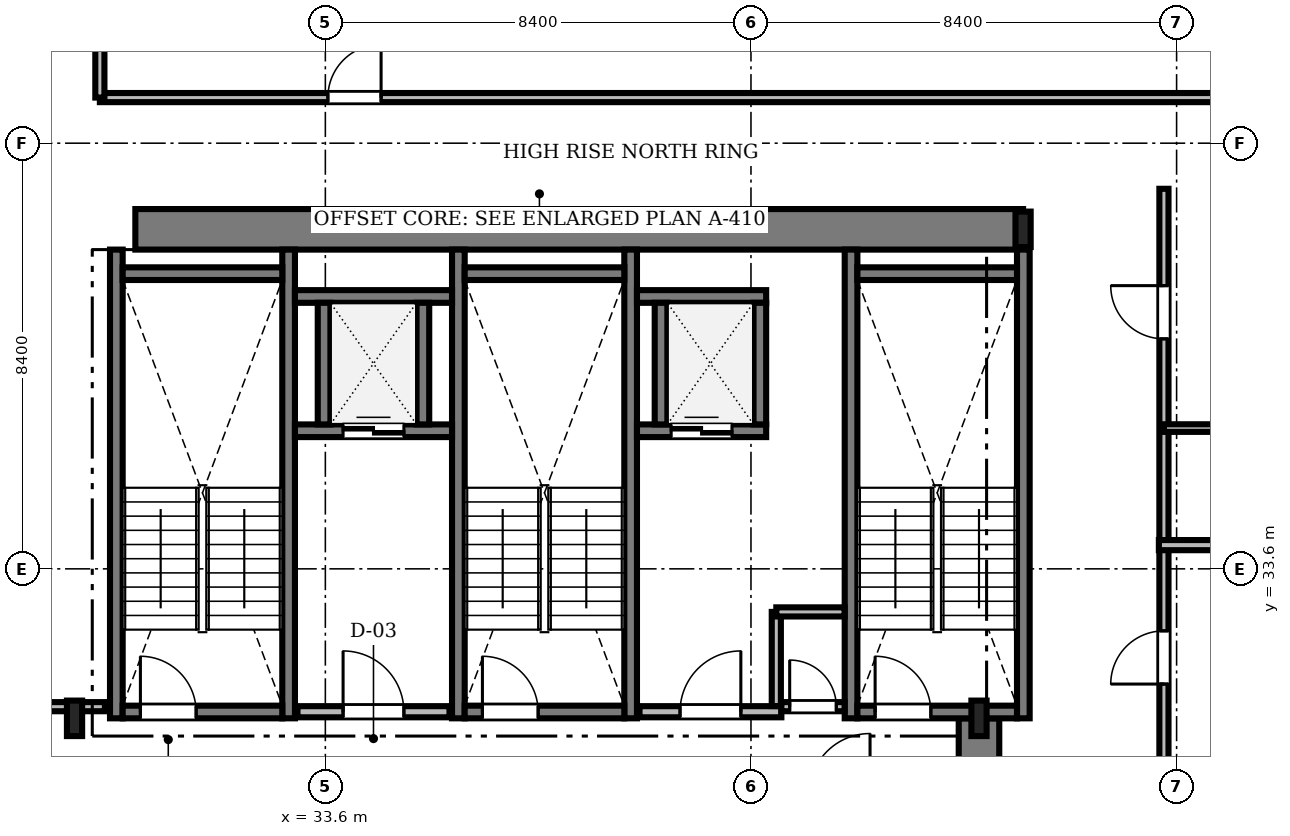
"""IFC4 building model, lengths in metres.
Left out: names, types, materials, properties, quantities, classifications, styles, units other than length and angle.
Written with IfcOpenShell. Run it as: python <this file> out.ifc"""

import sys

from ifc_helpers import new_model, si_unit, direction, frame, frame_2d, origin, origin_2d, place, context, subcontext, project, spatial, rectangle, i_section, extrude, source, transform, mapped, element, fill, save


model = new_model("IFC4")
c1 = context("Model", 3, precision=1e-05, world=origin(), true_north=direction((0.0, 1.0)))
c2 = subcontext(c1, "Body", "Model", "MODEL_VIEW")
j1 = project(units=[si_unit("LENGTHUNIT", "METRE"), si_unit("PLANEANGLEUNIT", "RADIAN")], contexts=[c1])
p1 = place(None, origin())
s1 = spatial("IfcSite", under=j1, at=p1, CompositionType="ELEMENT")
p2 = place(p1, origin())
s2 = spatial("IfcBuilding", under=s1, at=p2, CompositionType="ELEMENT")
p3 = place(p2, frame((0.0, 0.0, 229.8)))
s3 = spatial("IfcBuildingStorey", under=s2, at=p3, CompositionType="ELEMENT", Elevation=229.8)
m1 = source(origin(), c2, "Body", "SweptSolid", [
    extrude(rectangle(XDim=17.52, YDim=0.8, at=frame_2d((8.76, 0.0))), origin(), (0.0, 0.0, 1.0), 3.53),
])
p4 = place(p3, frame((29.85, 40.3, 0.0), z_axis=(0.0, 0.0, 1.0), x_axis=(1.0, 0.0, 0.0)))
e1 = element("IfcWall", 1, at=p4, inside=s3, PredefinedType="SHEAR", context=c2, shape_type="MappedRepresentation", body=[
    mapped(m1, transform((0.0, 0.0, 0.0), scale=1.0)),
])
m2 = source(origin(), c2, "Body", "SweptSolid", [
    extrude(rectangle(XDim=13.15, YDim=0.8, at=frame_2d((6.575, 0.0))), origin(), (0.0, 0.0, 1.0), 3.53),
])
p5 = place(p3, frame((46.5, 17.5, 0.0), z_axis=(0.0, 0.0, 1.0), x_axis=(0.0, 1.0, 0.0)))
e2 = element("IfcWall", 2, at=p5, inside=s3, PredefinedType="SHEAR", context=c2, shape_type="MappedRepresentation", body=[
    mapped(m2, transform((0.0, 0.0, 0.0), scale=1.0)),
])
m3 = source(origin(), c2, "Body", "SweptSolid", [
    extrude(i_section(OverallWidth=0.3, OverallDepth=0.7, WebThickness=0.017, FlangeThickness=0.032, FilletRadius=0.027, at=origin_2d()), origin(), (0.0, 0.0, 1.0), 3.53),
])
for number, where, z_axis, x_axis in (
    (3, (28.65, 30.65, 0.0), (0.0, 0.0, 1.0), (1.0, 0.0, 0.0)),
    (4, (46.5, 30.65, 0.0), (0.0, 0.0, 1.0), (1.0, 0.0, 0.0)),
    (5, (47.37, 40.3, 0.0), (0.0, 0.0, 1.0), (1.0, 0.0, 0.0)),
):
    element("IfcColumn", number, at=place(p3, frame(where, z_axis=z_axis, x_axis=x_axis)), inside=s3, PredefinedType="COLUMN", context=c2, shape_type="MappedRepresentation", body=[
        mapped(m3, transform((0.0, 0.0, 0.0), scale=1.0)),
    ])
m4 = source(origin(), c2, "Body", "SweptSolid", [
    extrude(rectangle(XDim=9.25, YDim=0.25, at=frame_2d((4.625, 0.0))), origin(), (0.0, 0.0, 1.0), 3.55),
])
for number, where, z_axis, x_axis in (
    (6, (29.475, 30.65, 0.0), (0.0, 0.0, 1.0), (0.0, 1.0, 0.0)),
    (7, (32.875, 30.65, 0.0), (0.0, 0.0, 1.0), (0.0, 1.0, 0.0)),
):
    element("IfcWall", number, at=place(p3, frame(where, z_axis=z_axis, x_axis=x_axis)), inside=s3, PredefinedType="SOLIDWALL", context=c2, shape_type="MappedRepresentation", body=[
        mapped(m4, transform((0.0, 0.0, 0.0), scale=1.0)),
    ])
m5 = source(origin(), c2, "Body", "SweptSolid", [
    extrude(rectangle(XDim=3.15, YDim=0.25, at=frame_2d((1.575, 0.0))), origin(), (0.0, 0.0, 1.0), 3.55),
])
p6 = place(p3, frame((29.6, 39.425, 0.0), z_axis=(0.0, 0.0, 1.0), x_axis=(1.0, 0.0, 0.0)))
e8 = element("IfcWall", 8, at=p6, inside=s3, PredefinedType="SOLIDWALL", context=c2, shape_type="MappedRepresentation", body=[
    mapped(m5, transform((0.0, 0.0, 0.0), scale=1.0)),
])
p7 = place(p3, frame((29.6, 30.775, 0.0), z_axis=(0.0, 0.0, 1.0), x_axis=(1.0, 0.0, 0.0)))
e9 = element("IfcWall", 9, at=p7, inside=s3, PredefinedType="SOLIDWALL", context=c2, shape_type="MappedRepresentation", body=[
    mapped(m5, transform((0.0, 0.0, 0.0), scale=1.0)),
])
m6 = source(origin(), c2, "Body", "SweptSolid", [
    extrude(rectangle(XDim=1.1, YDim=2.2, at=frame_2d((0.55, 1.1))), frame((0.0, 0.135, 0.0), z_axis=(0.0, -1.0, 0.0), x_axis=(1.0, 0.0, 0.0)), (0.0, 0.0, 1.0), 0.27),
])
p8 = place(p7, frame((0.35, 0.0, 0.0)))
e10 = element("IfcOpeningElement", 10, at=p8, cuts=e9, PredefinedType="OPENING", context=c2, shape_type="MappedRepresentation", body=[
    mapped(m6, transform((0.0, 0.0, 0.0), scale=1.0)),
])
for number, where, z_axis, x_axis in (
    (11, (36.225, 30.65, 0.0), (0.0, 0.0, 1.0), (0.0, 1.0, 0.0)),
    (12, (39.625, 30.65, 0.0), (0.0, 0.0, 1.0), (0.0, 1.0, 0.0)),
):
    element("IfcWall", number, at=place(p3, frame(where, z_axis=z_axis, x_axis=x_axis)), inside=s3, PredefinedType="SOLIDWALL", context=c2, shape_type="MappedRepresentation", body=[
        mapped(m4, transform((0.0, 0.0, 0.0), scale=1.0)),
    ])
p9 = place(p3, frame((36.35, 39.425, 0.0), z_axis=(0.0, 0.0, 1.0), x_axis=(1.0, 0.0, 0.0)))
e13 = element("IfcWall", 13, at=p9, inside=s3, PredefinedType="SOLIDWALL", context=c2, shape_type="MappedRepresentation", body=[
    mapped(m5, transform((0.0, 0.0, 0.0), scale=1.0)),
])
p10 = place(p3, frame((36.35, 30.775, 0.0), z_axis=(0.0, 0.0, 1.0), x_axis=(1.0, 0.0, 0.0)))
e14 = element("IfcWall", 14, at=p10, inside=s3, PredefinedType="SOLIDWALL", context=c2, shape_type="MappedRepresentation", body=[
    mapped(m5, transform((0.0, 0.0, 0.0), scale=1.0)),
])
p11 = place(p10, frame((0.35, 0.0, 0.0)))
e15 = element("IfcOpeningElement", 15, at=p11, cuts=e14, PredefinedType="OPENING", context=c2, shape_type="MappedRepresentation", body=[
    mapped(m6, transform((0.0, 0.0, 0.0), scale=1.0)),
])
for number, where, z_axis, x_axis in (
    (16, (43.975, 30.65, 0.0), (0.0, 0.0, 1.0), (0.0, 1.0, 0.0)),
    (17, (47.375, 30.65, 0.0), (0.0, 0.0, 1.0), (0.0, 1.0, 0.0)),
):
    element("IfcWall", number, at=place(p3, frame(where, z_axis=z_axis, x_axis=x_axis)), inside=s3, PredefinedType="SOLIDWALL", context=c2, shape_type="MappedRepresentation", body=[
        mapped(m4, transform((0.0, 0.0, 0.0), scale=1.0)),
    ])
p12 = place(p3, frame((44.1, 39.425, 0.0), z_axis=(0.0, 0.0, 1.0), x_axis=(1.0, 0.0, 0.0)))
e18 = element("IfcWall", 18, at=p12, inside=s3, PredefinedType="SOLIDWALL", context=c2, shape_type="MappedRepresentation", body=[
    mapped(m5, transform((0.0, 0.0, 0.0), scale=1.0)),
])
p13 = place(p3, frame((44.1, 30.775, 0.0), z_axis=(0.0, 0.0, 1.0), x_axis=(1.0, 0.0, 0.0)))
e19 = element("IfcWall", 19, at=p13, inside=s3, PredefinedType="SOLIDWALL", context=c2, shape_type="MappedRepresentation", body=[
    mapped(m5, transform((0.0, 0.0, 0.0), scale=1.0)),
])
p14 = place(p13, frame((0.35, 0.0, 0.0)))
e20 = element("IfcOpeningElement", 20, at=p14, cuts=e19, PredefinedType="OPENING", context=c2, shape_type="MappedRepresentation", body=[
    mapped(m6, transform((0.0, 0.0, 0.0), scale=1.0)),
])
m7 = source(origin(), c2, "Body", "SweptSolid", [
    extrude(rectangle(XDim=3.0, YDim=0.22, at=frame_2d((1.5, 0.0))), origin(), (0.0, 0.0, 1.0), 3.53),
])
p15 = place(p3, frame((33.05, 30.78, 0.0), z_axis=(0.0, 0.0, 1.0), x_axis=(1.0, 0.0, 0.0)))
e21 = element("IfcWall", 21, at=p15, inside=s3, PredefinedType="SOLIDWALL", context=c2, shape_type="MappedRepresentation", body=[
    mapped(m7, transform((0.0, 0.0, 0.0), scale=1.0)),
])
m8 = source(origin(), c2, "Body", "SweptSolid", [
    extrude(rectangle(XDim=1.2, YDim=2.2, at=frame_2d((0.6, 1.1))), frame((0.0, 0.12, 0.0), z_axis=(0.0, -1.0, 0.0), x_axis=(1.0, 0.0, 0.0)), (0.0, 0.0, 1.0), 0.24),
])
p16 = place(p15, frame((0.9, 0.0, 0.0)))
e22 = element("IfcOpeningElement", 22, at=p16, cuts=e21, PredefinedType="OPENING", context=c2, shape_type="MappedRepresentation", body=[
    mapped(m8, transform((0.0, 0.0, 0.0), scale=1.0)),
])
m9 = source(origin(), c2, "Body", "SweptSolid", [
    extrude(rectangle(XDim=2.8, YDim=0.22, at=frame_2d((1.4, 0.0))), origin(), (0.0, 0.0, 1.0), 3.53),
])
p17 = place(p3, frame((39.8, 30.78, 0.0), z_axis=(0.0, 0.0, 1.0), x_axis=(1.0, 0.0, 0.0)))
e23 = element("IfcWall", 23, at=p17, inside=s3, PredefinedType="SOLIDWALL", context=c2, shape_type="MappedRepresentation", body=[
    mapped(m9, transform((0.0, 0.0, 0.0), scale=1.0)),
])
p18 = place(p17, frame((0.8, 0.0, 0.0)))
e24 = element("IfcOpeningElement", 24, at=p18, cuts=e23, PredefinedType="OPENING", context=c2, shape_type="MappedRepresentation", body=[
    mapped(m8, transform((0.0, 0.0, 0.0), scale=1.0)),
])
m10 = source(origin(), c2, "Body", "SweptSolid", [
    extrude(rectangle(XDim=3.1, YDim=0.25, at=frame_2d((1.55, 0.0))), origin(), (0.0, 0.0, 1.0), 3.53),
])
p19 = place(p3, frame((33.0, 36.325, 0.0), z_axis=(0.0, 0.0, 1.0), x_axis=(1.0, 0.0, 0.0)))
e25 = element("IfcWall", 25, at=p19, inside=s3, PredefinedType="SOLIDWALL", context=c2, shape_type="MappedRepresentation", body=[
    mapped(m10, transform((0.0, 0.0, 0.0), scale=1.0)),
])
m11 = source(origin(), c2, "Body", "SweptSolid", [
    extrude(rectangle(XDim=1.2, YDim=2.25, at=frame_2d((0.6, 1.125))), frame((0.0, 0.135, 0.0), z_axis=(0.0, -1.0, 0.0), x_axis=(1.0, 0.0, 0.0)), (0.0, 0.0, 1.0), 0.27),
])
p20 = place(p19, frame((0.95, 0.0, 0.0)))
e26 = element("IfcOpeningElement", 26, at=p20, cuts=e25, PredefinedType="OPENING", context=c2, shape_type="MappedRepresentation", body=[
    mapped(m11, transform((0.0, 0.0, 0.0), scale=1.0)),
])
p21 = place(p3, frame((33.0, 38.975, 0.0), z_axis=(0.0, 0.0, 1.0), x_axis=(1.0, 0.0, 0.0)))
e27 = element("IfcWall", 27, at=p21, inside=s3, PredefinedType="SOLIDWALL", context=c2, shape_type="MappedRepresentation", body=[
    mapped(m10, transform((0.0, 0.0, 0.0), scale=1.0)),
])
m12 = source(origin(), c2, "Body", "SweptSolid", [
    extrude(rectangle(XDim=2.4, YDim=0.25, at=frame_2d((1.2, 0.0))), origin(), (0.0, 0.0, 1.0), 3.53),
])
for number, where, z_axis, x_axis in (
    (28, (33.575, 36.45, 0.0), (0.0, 0.0, 1.0), (0.0, 1.0, 0.0)),
    (29, (35.525, 36.45, 0.0), (0.0, 0.0, 1.0), (0.0, 1.0, 0.0)),
):
    element("IfcWall", number, at=place(p3, frame(where, z_axis=z_axis, x_axis=x_axis)), inside=s3, PredefinedType="SOLIDWALL", context=c2, shape_type="MappedRepresentation", body=[
        mapped(m12, transform((0.0, 0.0, 0.0), scale=1.0)),
    ])
m13 = source(origin(), c2, "Body", "SweptSolid", [
    extrude(rectangle(XDim=2.55, YDim=0.25, at=frame_2d((1.275, 0.0))), origin(), (0.0, 0.0, 1.0), 3.53),
])
p22 = place(p3, frame((39.75, 36.325, 0.0), z_axis=(0.0, 0.0, 1.0), x_axis=(1.0, 0.0, 0.0)))
e30 = element("IfcWall", 30, at=p22, inside=s3, PredefinedType="SOLIDWALL", context=c2, shape_type="MappedRepresentation", body=[
    mapped(m13, transform((0.0, 0.0, 0.0), scale=1.0)),
])
p23 = place(p22, frame((0.675, 0.0, 0.0)))
e31 = element("IfcOpeningElement", 31, at=p23, cuts=e30, PredefinedType="OPENING", context=c2, shape_type="MappedRepresentation", body=[
    mapped(m11, transform((0.0, 0.0, 0.0), scale=1.0)),
])
p24 = place(p3, frame((39.75, 38.975, 0.0), z_axis=(0.0, 0.0, 1.0), x_axis=(1.0, 0.0, 0.0)))
e32 = element("IfcWall", 32, at=p24, inside=s3, PredefinedType="SOLIDWALL", context=c2, shape_type="MappedRepresentation", body=[
    mapped(m13, transform((0.0, 0.0, 0.0), scale=1.0)),
])
for number, where, z_axis, x_axis in (
    (33, (40.225, 36.45, 0.0), (0.0, 0.0, 1.0), (0.0, 1.0, 0.0)),
    (34, (42.175, 36.45, 0.0), (0.0, 0.0, 1.0), (0.0, 1.0, 0.0)),
):
    element("IfcWall", number, at=place(p3, frame(where, z_axis=z_axis, x_axis=x_axis)), inside=s3, PredefinedType="SOLIDWALL", context=c2, shape_type="MappedRepresentation", body=[
        mapped(m12, transform((0.0, 0.0, 0.0), scale=1.0)),
    ])
m14 = source(origin(), c2, "Body", "SweptSolid", [
    extrude(rectangle(XDim=28.428, YDim=0.18, at=frame_2d((14.214, 0.0))), origin(), (0.0, 0.0, 1.0), 2.772),
])
p25 = place(p3, frame((29.15, 42.9, 0.0), z_axis=(0.0, 0.0, 1.0), x_axis=(1.0, 0.0, 0.0)))
e35 = element("IfcWall", 35, at=p25, inside=s3, PredefinedType="PARTITIONING", context=c2, shape_type="MappedRepresentation", body=[
    mapped(m14, transform((0.0, 0.0, 0.0), scale=1.0)),
])
m15 = source(origin(), c2, "Body", "SweptSolid", [
    extrude(rectangle(XDim=1.05, YDim=2.2, at=frame_2d((0.525, 1.1))), frame((0.0, 0.1, 0.0), z_axis=(0.0, -1.0, 0.0), x_axis=(1.0, 0.0, 0.0)), (0.0, 0.0, 1.0), 0.2),
])
p26 = place(p25, frame((4.5, 0.0, 0.0)))
e36 = element("IfcOpeningElement", 36, at=p26, cuts=e35, PredefinedType="OPENING", context=c2, shape_type="MappedRepresentation", body=[
    mapped(m15, transform((0.0, 0.0, 0.0), scale=1.0)),
])
m16 = source(origin(), c2, "Body", "SweptSolid", [
    extrude(rectangle(XDim=27.47, YDim=0.18, at=frame_2d((13.735, 0.0))), origin(), (0.0, 0.0, 1.0), 2.972),
])
p27 = place(p3, frame((50.15, 13.63, 0.0), z_axis=(0.0, 0.0, 1.0), x_axis=(0.0, 1.0, 0.0)))
e37 = element("IfcWall", 37, at=p27, inside=s3, PredefinedType="PARTITIONING", context=c2, shape_type="MappedRepresentation", body=[
    mapped(m16, transform((0.0, 0.0, 0.0), scale=1.0)),
])
p28 = place(p27, frame((4.071, 0.0, 0.0)))
e38 = element("IfcOpeningElement", 38, at=p28, cuts=e37, PredefinedType="OPENING", context=c2, shape_type="MappedRepresentation", body=[
    mapped(m15, transform((0.0, 0.0, 0.0), scale=1.0)),
])
p29 = place(p27, frame((10.884, 0.0, 0.0)))
e39 = element("IfcOpeningElement", 39, at=p29, cuts=e37, PredefinedType="OPENING", context=c2, shape_type="MappedRepresentation", body=[
    mapped(m15, transform((0.0, 0.0, 0.0), scale=1.0)),
])
p30 = place(p27, frame((17.696, 0.0, 0.0)))
e40 = element("IfcOpeningElement", 40, at=p30, cuts=e37, PredefinedType="OPENING", context=c2, shape_type="MappedRepresentation", body=[
    mapped(m15, transform((0.0, 0.0, 0.0), scale=1.0)),
])
p31 = place(p27, frame((24.509, 0.0, 0.0)))
e41 = element("IfcOpeningElement", 41, at=p31, cuts=e37, PredefinedType="OPENING", context=c2, shape_type="MappedRepresentation", body=[
    mapped(m15, transform((0.0, 0.0, 0.0), scale=1.0)),
])
m17 = source(origin(), c2, "Body", "SweptSolid", [
    extrude(rectangle(XDim=17.828, YDim=0.18, at=frame_2d((8.914, 0.0))), origin(), (0.0, 0.0, 1.0), 2.772),
])
p32 = place(p3, frame((11.422, 30.88, 0.0), z_axis=(0.0, 0.0, 1.0), x_axis=(1.0, 0.0, 0.0)))
e42 = element("IfcWall", 42, at=p32, inside=s3, PredefinedType="PARTITIONING", context=c2, shape_type="MappedRepresentation", body=[
    mapped(m17, transform((0.0, 0.0, 0.0), scale=1.0)),
])
p33 = place(p32, frame((10.778, 0.0, 0.0)))
e43 = element("IfcOpeningElement", 43, at=p33, cuts=e42, PredefinedType="OPENING", context=c2, shape_type="MappedRepresentation", body=[
    mapped(m15, transform((0.0, 0.0, 0.0), scale=1.0)),
])
m18 = source(origin(), c2, "Body", "SweptSolid", [
    extrude(rectangle(XDim=1.248, YDim=0.18, at=frame_2d((0.624, 0.0))), origin(), (0.0, 0.0, 1.0), 3.53),
])
p34 = place(p3, frame((42.6, 30.88, 0.0), z_axis=(0.0, 0.0, 1.0), x_axis=(1.0, 0.0, 0.0)))
e44 = element("IfcWall", 44, at=p34, inside=s3, PredefinedType="PARTITIONING", context=c2, shape_type="MappedRepresentation", body=[
    mapped(m18, transform((0.0, 0.0, 0.0), scale=1.0)),
])
m19 = source(origin(), c2, "Body", "SweptSolid", [
    extrude(rectangle(XDim=0.92, YDim=2.1, at=frame_2d((0.46, 1.05))), frame((0.0, 0.1, 0.0), z_axis=(0.0, -1.0, 0.0), x_axis=(1.0, 0.0, 0.0)), (0.0, 0.0, 1.0), 0.2),
])
p35 = place(p34, frame((0.164, 0.0, 0.0)))
e45 = element("IfcOpeningElement", 45, at=p35, cuts=e44, PredefinedType="OPENING", context=c2, shape_type="MappedRepresentation", body=[
    mapped(m19, transform((0.0, 0.0, 0.0), scale=1.0)),
])
m20 = source(origin(), c2, "Body", "SweptSolid", [
    extrude(rectangle(XDim=7.528, YDim=0.2, at=frame_2d((3.764, 0.0))), origin(), (0.0, 0.0, 1.0), 2.772),
])
p36 = place(p3, frame((50.05, 34.068, 0.0), z_axis=(0.0, 0.0, 1.0), x_axis=(1.0, 0.0, 0.0)))
e46 = element("IfcWall", 46, at=p36, inside=s3, PredefinedType="PARTITIONING", context=c2, shape_type="MappedRepresentation", body=[
    mapped(m20, transform((0.0, 0.0, 0.0), scale=1.0)),
])
m21 = source(origin(), c2, "Body", "SweptSolid", [
    extrude(rectangle(XDim=5.378, YDim=0.18, at=frame_2d((2.689, 0.0))), origin(), (0.0, 0.0, 1.0), 2.772),
])
p37 = place(p3, frame((29.15, 42.9, 0.0), z_axis=(0.0, 0.0, 1.0), x_axis=(0.0, 1.0, 0.0)))
e47 = element("IfcWall", 47, at=p37, inside=s3, PredefinedType="PARTITIONING", context=c2, shape_type="MappedRepresentation", body=[
    mapped(m21, transform((0.0, 0.0, 0.0), scale=1.0)),
])
m22 = source(origin(), c2, "Body", "SweptSolid", [
    extrude(rectangle(XDim=2.36, YDim=0.15, at=frame_2d((1.18, 0.0))), origin(), (0.0, 0.0, 1.0), 3.53),
])
p38 = place(p3, frame((50.15, 36.378, 0.0), z_axis=(0.0, 0.0, 1.0), x_axis=(1.0, 0.0, 0.0)))
e48 = element("IfcWall", 48, at=p38, inside=s3, PredefinedType="PARTITIONING", context=c2, shape_type="MappedRepresentation", body=[
    mapped(m22, transform((0.0, 0.0, 0.0), scale=1.0)),
])
m23 = source(origin(), c2, "Body", "SweptSolid", [
    extrude(rectangle(XDim=1.858, YDim=0.18, at=frame_2d((0.929, 0.0))), origin(), (0.0, 0.0, 1.0), 3.53),
])
p39 = place(p3, frame((42.5, 30.892, 0.0), z_axis=(0.0, 0.0, 1.0), x_axis=(0.0, 1.0, 0.0)))
e49 = element("IfcWall", 49, at=p39, inside=s3, PredefinedType="PARTITIONING", context=c2, shape_type="MappedRepresentation", body=[
    mapped(m23, transform((0.0, 0.0, 0.0), scale=1.0)),
])
m24 = source(origin(), c2, "Body", "SweptSolid", [
    extrude(rectangle(XDim=1.348, YDim=0.18, at=frame_2d((0.674, 0.0))), origin(), (0.0, 0.0, 1.0), 3.53),
])
p40 = place(p3, frame((42.5, 32.75, 0.0), z_axis=(0.0, 0.0, 1.0), x_axis=(1.0, 0.0, 0.0)))
e50 = element("IfcWall", 50, at=p40, inside=s3, PredefinedType="PARTITIONING", context=c2, shape_type="MappedRepresentation", body=[
    mapped(m24, transform((0.0, 0.0, 0.0), scale=1.0)),
])
m25 = source(origin(), c2, "Body", "SweptSolid", [
    extrude(rectangle(XDim=1.1, YDim=2.2, at=frame_2d((0.55, 1.1))), frame((0.0, 0.025, 0.0), z_axis=(0.0, -1.0, 0.0), x_axis=(1.0, 0.0, 0.0)), (0.0, 0.0, 1.0), 0.05),
])
p41 = place(p8, origin())
e51 = element("IfcDoor", 51, at=p41, inside=s3, OperationType="SINGLE_SWING_LEFT", PredefinedType="DOOR", context=c2, shape_type="MappedRepresentation", body=[
    mapped(m25, transform((0.0, 0.0, 0.0), scale=1.0)),
])
fill(e10, e51)
p42 = place(p11, origin())
e52 = element("IfcDoor", 52, at=p42, inside=s3, OperationType="SINGLE_SWING_LEFT", PredefinedType="DOOR", context=c2, shape_type="MappedRepresentation", body=[
    mapped(m25, transform((0.0, 0.0, 0.0), scale=1.0)),
])
fill(e15, e52)
p43 = place(p14, origin())
e53 = element("IfcDoor", 53, at=p43, inside=s3, OperationType="SINGLE_SWING_LEFT", PredefinedType="DOOR", context=c2, shape_type="MappedRepresentation", body=[
    mapped(m25, transform((0.0, 0.0, 0.0), scale=1.0)),
])
fill(e20, e53)
m26 = source(origin(), c2, "Body", "SweptSolid", [
    extrude(rectangle(XDim=1.2, YDim=2.2, at=frame_2d((0.6, 1.1))), frame((0.0, 0.025, 0.0), z_axis=(0.0, -1.0, 0.0), x_axis=(1.0, 0.0, 0.0)), (0.0, 0.0, 1.0), 0.05),
])
p44 = place(p16, origin())
e54 = element("IfcDoor", 54, at=p44, inside=s3, OperationType="SINGLE_SWING_LEFT", PredefinedType="DOOR", context=c2, shape_type="MappedRepresentation", body=[
    mapped(m26, transform((0.0, 0.0, 0.0), scale=1.0)),
])
fill(e22, e54)
p45 = place(p18, origin())
e55 = element("IfcDoor", 55, at=p45, inside=s3, OperationType="SINGLE_SWING_RIGHT", PredefinedType="DOOR", context=c2, shape_type="MappedRepresentation", body=[
    mapped(m26, transform((0.0, 0.0, 0.0), scale=1.0)),
])
fill(e24, e55)
m27 = source(origin(), c2, "Body", "SweptSolid", [
    extrude(rectangle(XDim=1.2, YDim=2.25, at=frame_2d((0.6, 1.125))), frame((0.0, 0.025, 0.0), z_axis=(0.0, -1.0, 0.0), x_axis=(1.0, 0.0, 0.0)), (0.0, 0.0, 1.0), 0.05),
])
p46 = place(p20, origin())
e56 = element("IfcDoor", 56, at=p46, inside=s3, OperationType="DOUBLE_DOOR_SLIDING", PredefinedType="DOOR", context=c2, shape_type="MappedRepresentation", body=[
    mapped(m27, transform((0.0, 0.0, 0.0), scale=1.0)),
])
fill(e26, e56)
p47 = place(p23, origin())
e57 = element("IfcDoor", 57, at=p47, inside=s3, OperationType="DOUBLE_DOOR_SLIDING", PredefinedType="DOOR", context=c2, shape_type="MappedRepresentation", body=[
    mapped(m27, transform((0.0, 0.0, 0.0), scale=1.0)),
])
fill(e31, e57)
m28 = source(origin(), c2, "Body", "SweptSolid", [
    extrude(rectangle(XDim=1.05, YDim=2.2, at=frame_2d((0.525, 1.1))), frame((0.0, 0.025, 0.0), z_axis=(0.0, -1.0, 0.0), x_axis=(1.0, 0.0, 0.0)), (0.0, 0.0, 1.0), 0.05),
])
p48 = place(p26, origin())
e58 = element("IfcDoor", 58, at=p48, inside=s3, OperationType="SINGLE_SWING_RIGHT", PredefinedType="DOOR", context=c2, shape_type="MappedRepresentation", body=[
    mapped(m28, transform((0.0, 0.0, 0.0), scale=1.0)),
])
fill(e36, e58)
p49 = place(p30, origin())
e59 = element("IfcDoor", 59, at=p49, inside=s3, OperationType="SINGLE_SWING_LEFT", PredefinedType="DOOR", context=c2, shape_type="MappedRepresentation", body=[
    mapped(m28, transform((0.0, 0.0, 0.0), scale=1.0)),
])
fill(e40, e59)
p50 = place(p31, origin())
e60 = element("IfcDoor", 60, at=p50, inside=s3, OperationType="SINGLE_SWING_RIGHT", PredefinedType="DOOR", context=c2, shape_type="MappedRepresentation", body=[
    mapped(m28, transform((0.0, 0.0, 0.0), scale=1.0)),
])
fill(e41, e60)
m29 = source(origin(), c2, "Body", "SweptSolid", [
    extrude(rectangle(XDim=0.92, YDim=2.1, at=frame_2d((0.46, 1.05))), frame((0.0, 0.025, 0.0), z_axis=(0.0, -1.0, 0.0), x_axis=(1.0, 0.0, 0.0)), (0.0, 0.0, 1.0), 0.05),
])
p51 = place(p35, origin())
e61 = element("IfcDoor", 61, at=p51, inside=s3, OperationType="SINGLE_SWING_LEFT", PredefinedType="DOOR", context=c2, shape_type="MappedRepresentation", body=[
    mapped(m29, transform((0.0, 0.0, 0.0), scale=1.0)),
])
fill(e45, e61)
save(model, sys.argv[1])
